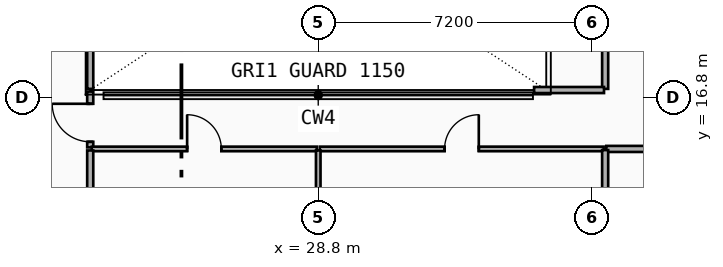
"""IFC4 building model, lengths in metres.
Left out: names, types, materials, properties, quantities, classifications, styles, units other than length and angle.
Written with IfcOpenShell. Run it as: python <this file> out.ifc"""

import sys

from ifc_helpers import new_model, si_unit, direction, frame, frame_2d, origin, place, context, subcontext, project, spatial, rectangle, extrude, element, fill, save


model = new_model("IFC4")
c1 = context("Model", 3, precision=1e-05, world=origin(), true_north=direction((0.0, 1.0)))
c2 = subcontext(c1, "Body", "Model", "MODEL_VIEW")
j1 = project(units=[si_unit("LENGTHUNIT", "METRE"), si_unit("PLANEANGLEUNIT", "RADIAN")], contexts=[c1])
p1 = place(None, origin())
s1 = spatial("IfcSite", under=j1, at=p1, CompositionType="ELEMENT")
p2 = place(p1, origin())
s2 = spatial("IfcBuilding", under=s1, at=p2, CompositionType="ELEMENT")
p3 = place(p2, frame((0.0, 0.0, 169.65)))
s3 = spatial("IfcBuildingStorey", under=s2, at=p3, CompositionType="ELEMENT", Elevation=169.65)
p4 = place(p3, frame((22.8, 15.49, 0.0), z_axis=(0.0, 0.0, 1.0), x_axis=(0.0, 1.0, 0.0)))
e1 = element("IfcWall", 1, at=p4, inside=s3, PredefinedType="PARTITIONING", context=c2, shape_type="SweptSolid", body=[
    extrude(rectangle(XDim=1.47, YDim=0.16, at=frame_2d((0.735, 0.0))), origin(), (0.0, 0.0, 1.0), 2.73),
])
p5 = place(p4, frame((0.148, 0.0, 0.0)))
e2 = element("IfcOpeningElement", 2, at=p5, cuts=e1, PredefinedType="OPENING", context=c2, shape_type="SweptSolid", body=[
    extrude(rectangle(XDim=1.0, YDim=2.15, at=frame_2d((0.5, 1.075))), frame((0.0, 0.09, 0.0), z_axis=(0.0, -1.0, 0.0), x_axis=(1.0, 0.0, 0.0)), (0.0, 0.0, 1.0), 0.18),
])
p6 = place(p3, frame((22.84, 15.45, 0.0), z_axis=(0.0, 0.0, 1.0), x_axis=(1.0, 0.0, 0.0)))
e3 = element("IfcWall", 3, at=p6, inside=s3, PredefinedType="PARTITIONING", context=c2, shape_type="SweptSolid", body=[
    extrude(rectangle(XDim=5.92, YDim=0.12, at=frame_2d((2.96, 0.0))), origin(), (0.0, 0.0, 1.0), 2.36),
])
p7 = place(p6, frame((2.51, 0.0, 0.0)))
e4 = element("IfcOpeningElement", 4, at=p7, cuts=e3, PredefinedType="OPENING", context=c2, shape_type="SweptSolid", body=[
    extrude(rectangle(XDim=0.9, YDim=2.1, at=frame_2d((0.45, 1.05))), frame((0.0, 0.07, 0.0), z_axis=(0.0, -1.0, 0.0), x_axis=(1.0, 0.0, 0.0)), (0.0, 0.0, 1.0), 0.14),
])
p8 = place(p3, frame((28.84, 15.45, 0.0), z_axis=(0.0, 0.0, 1.0), x_axis=(1.0, 0.0, 0.0)))
e5 = element("IfcWall", 5, at=p8, inside=s3, PredefinedType="PARTITIONING", context=c2, shape_type="SweptSolid", body=[
    extrude(rectangle(XDim=7.47, YDim=0.12, at=frame_2d((3.735, 0.0))), origin(), (0.0, 0.0, 1.0), 2.36),
])
p9 = place(p8, frame((3.285, 0.0, 0.0)))
e6 = element("IfcOpeningElement", 6, at=p9, cuts=e5, PredefinedType="OPENING", context=c2, shape_type="SweptSolid", body=[
    extrude(rectangle(XDim=0.9, YDim=2.1, at=frame_2d((0.45, 1.05))), frame((0.0, 0.07, 0.0), z_axis=(0.0, -1.0, 0.0), x_axis=(1.0, 0.0, 0.0)), (0.0, 0.0, 1.0), 0.14),
])
p10 = place(p3, frame((22.8, 10.66, 0.0), z_axis=(0.0, 0.0, 1.0), x_axis=(0.0, 1.0, 0.0)))
e7 = element("IfcWall", 7, at=p10, inside=s3, PredefinedType="PARTITIONING", context=c2, shape_type="SweptSolid", body=[
    extrude(rectangle(XDim=4.75, YDim=0.16, at=frame_2d((2.375, 0.0))), origin(), (0.0, 0.0, 1.0), 2.91),
])
p11 = place(p3, frame((28.8, 10.66, 0.0), z_axis=(0.0, 0.0, 1.0), x_axis=(0.0, 1.0, 0.0)))
e8 = element("IfcWall", 8, at=p11, inside=s3, PredefinedType="PARTITIONING", context=c2, shape_type="SweptSolid", body=[
    extrude(rectangle(XDim=4.75, YDim=0.12, at=frame_2d((2.375, 0.0))), origin(), (0.0, 0.0, 1.0), 2.36),
])
p12 = place(p3, frame((36.38, 15.45, 0.0), z_axis=(0.0, 0.0, 1.0), x_axis=(1.0, 0.0, 0.0)))
e9 = element("IfcWall", 9, at=p12, inside=s3, PredefinedType="PARTITIONING", context=c2, shape_type="SweptSolid", body=[
    extrude(rectangle(XDim=1.94, YDim=0.16, at=frame_2d((0.97, 0.0))), origin(), (0.0, 0.0, 1.0), 2.36),
])
p13 = place(p3, frame((36.35, 17.03, 0.0), z_axis=(0.0, 0.0, 1.0), x_axis=(0.0, 1.0, 0.0)))
e10 = element("IfcWall", 10, at=p13, inside=s3, PredefinedType="PARTITIONING", context=c2, shape_type="SweptSolid", body=[
    extrude(rectangle(XDim=8.49, YDim=0.16, at=frame_2d((4.245, 0.0))), origin(), (0.0, 0.0, 1.0), 2.36),
])
p14 = place(p3, frame((34.48, 17.0, 0.0), z_axis=(0.0, 0.0, 1.0), x_axis=(1.0, 0.0, 0.0)))
e11 = element("IfcWall", 11, at=p14, inside=s3, PredefinedType="PARTITIONING", context=c2, shape_type="SweptSolid", body=[
    extrude(rectangle(XDim=1.84, YDim=0.16, at=frame_2d((0.92, 0.0))), origin(), (0.0, 0.0, 1.0), 2.36),
])
p15 = place(p3, frame((22.8, 17.03, 0.0), z_axis=(0.0, 0.0, 1.0), x_axis=(0.0, 1.0, 0.0)))
e12 = element("IfcWall", 12, at=p15, inside=s3, PredefinedType="PARTITIONING", context=c2, shape_type="SweptSolid", body=[
    extrude(rectangle(XDim=8.49, YDim=0.16, at=frame_2d((4.245, 0.0))), origin(), (0.0, 0.0, 1.0), 2.73),
])
p16 = place(p3, frame((36.35, 10.69, 0.0), z_axis=(0.0, 0.0, 1.0), x_axis=(0.0, 1.0, 0.0)))
e13 = element("IfcWall", 13, at=p16, inside=s3, PredefinedType="PARTITIONING", context=c2, shape_type="SweptSolid", body=[
    extrude(rectangle(XDim=4.73, YDim=0.16, at=frame_2d((2.365, 0.0))), origin(), (0.0, 0.0, 1.0), 2.36),
])
p17 = place(p5, origin())
e14 = element("IfcDoor", 14, at=p17, inside=s3, OperationType="SINGLE_SWING_RIGHT", PredefinedType="DOOR", context=c2, shape_type="SweptSolid", body=[
    extrude(rectangle(XDim=1.0, YDim=2.15, at=frame_2d((0.5, 1.075))), frame((0.0, 0.025, 0.0), z_axis=(0.0, -1.0, 0.0), x_axis=(1.0, 0.0, 0.0)), (0.0, 0.0, 1.0), 0.05),
])
fill(e2, e14)
p18 = place(p7, origin())
e15 = element("IfcDoor", 15, at=p18, inside=s3, OperationType="SINGLE_SWING_LEFT", PredefinedType="DOOR", context=c2, shape_type="SweptSolid", body=[
    extrude(rectangle(XDim=0.9, YDim=2.1, at=frame_2d((0.45, 1.05))), frame((0.0, 0.025, 0.0), z_axis=(0.0, -1.0, 0.0), x_axis=(1.0, 0.0, 0.0)), (0.0, 0.0, 1.0), 0.05),
])
fill(e4, e15)
p19 = place(p9, origin())
e16 = element("IfcDoor", 16, at=p19, inside=s3, OperationType="SINGLE_SWING_RIGHT", PredefinedType="DOOR", context=c2, shape_type="SweptSolid", body=[
    extrude(rectangle(XDim=0.9, YDim=2.1, at=frame_2d((0.45, 1.05))), frame((0.0, 0.025, 0.0), z_axis=(0.0, -1.0, 0.0), x_axis=(1.0, 0.0, 0.0)), (0.0, 0.0, 1.0), 0.05),
])
fill(e6, e16)
save(model, sys.argv[1])
